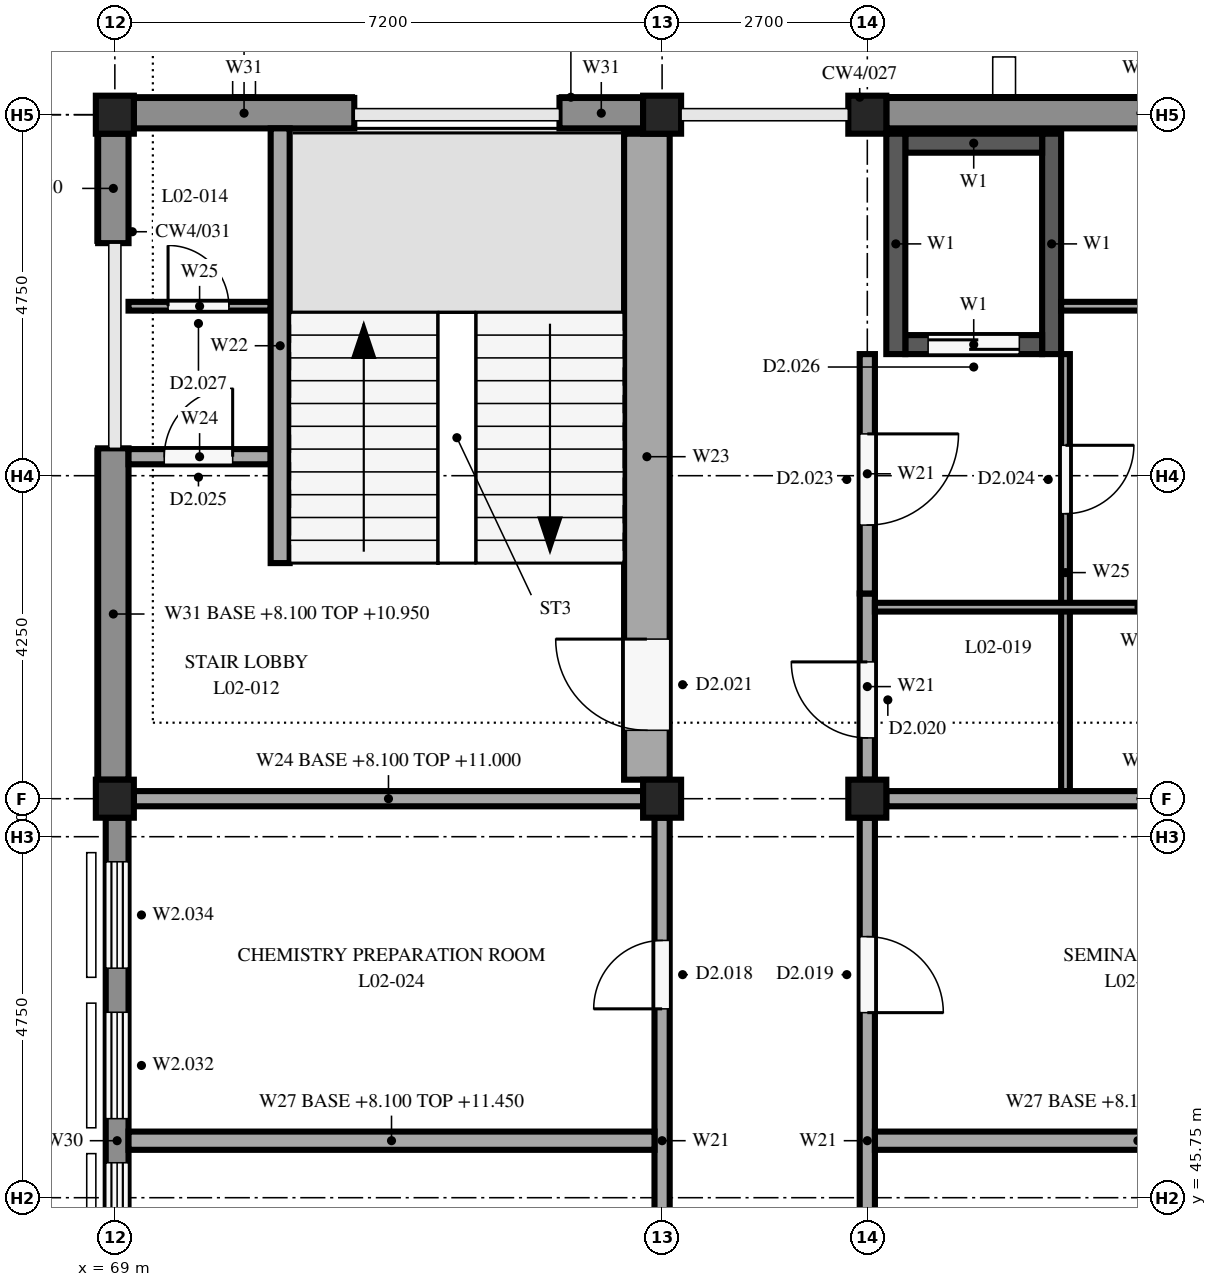
"""IFC4 building model, lengths in metres.
Left out: names, types, materials, properties, quantities, classifications, styles, units other than length and angle.
Written with IfcOpenShell. Run it as: python <this file> out.ifc"""

import sys

from ifc_helpers import new_model, si_unit, direction, frame, frame_2d, origin, origin_2d, place, context, subcontext, project, spatial, rectangle, extrude, element, fill, save


model = new_model("IFC4")
c1 = context("Model", 3, precision=1e-05, world=origin(), true_north=direction((0.0, 1.0)))
c2 = subcontext(c1, "Body", "Model", "MODEL_VIEW")
j1 = project(units=[si_unit("LENGTHUNIT", "METRE"), si_unit("PLANEANGLEUNIT", "RADIAN")], contexts=[c1])
p1 = place(None, origin())
s1 = spatial("IfcSite", under=j1, at=p1, CompositionType="ELEMENT")
p2 = place(p1, origin())
s2 = spatial("IfcBuilding", under=s1, at=p2, CompositionType="ELEMENT")
p3 = place(p2, frame((0.0, 0.0, 8.1)))
s3 = spatial("IfcBuildingStorey", under=s2, at=p3, CompositionType="ELEMENT", Elevation=8.1)
for number, where, z_axis, x_axis in (
    (1, (69.0, 51.0, 0.0), (0.0, 0.0, 1.0), (1.0, 0.0, 0.0)),
    (2, (69.0, 60.0, 0.0), (0.0, 0.0, 1.0), (1.0, 0.0, 0.0)),
    (3, (76.2, 51.0, 0.0), (0.0, 0.0, 1.0), (1.0, 0.0, 0.0)),
    (4, (76.2, 60.0, 0.0), (0.0, 0.0, 1.0), (1.0, 0.0, 0.0)),
    (5, (78.9, 51.0, 0.0), (0.0, 0.0, 1.0), (1.0, 0.0, 0.0)),
    (6, (78.9, 60.0, 0.0), (0.0, 0.0, 1.0), (1.0, 0.0, 0.0)),
):
    element("IfcColumn", number, at=place(p3, frame(where, z_axis=z_axis, x_axis=x_axis)), inside=s3, PredefinedType="COLUMN", context=c2, shape_type="SweptSolid", body=[
        extrude(rectangle(XDim=0.5, YDim=0.5, at=origin_2d()), origin(), (0.0, 0.0, 1.0), 3.35),
    ])
for number, where, z_axis, x_axis in (
    (7, (79.275, 56.85, 0.0), (0.0, 0.0, 1.0), (0.0, 1.0, 0.0)),
    (8, (81.325, 56.85, 0.0), (0.0, 0.0, 1.0), (0.0, 1.0, 0.0)),
):
    element("IfcWall", number, at=place(p3, frame(where, z_axis=z_axis, x_axis=x_axis)), inside=s3, PredefinedType="SHEAR", context=c2, shape_type="SweptSolid", body=[
        extrude(rectangle(XDim=2.9, YDim=0.25, at=frame_2d((1.45, 0.0))), origin(), (0.0, 0.0, 1.0), 3.35),
    ])
p4 = place(p3, frame((79.4, 56.975, 0.0), z_axis=(0.0, 0.0, 1.0), x_axis=(1.0, 0.0, 0.0)))
e9 = element("IfcWall", 9, at=p4, inside=s3, PredefinedType="SHEAR", context=c2, shape_type="SweptSolid", body=[
    extrude(rectangle(XDim=1.8, YDim=0.25, at=frame_2d((0.9, 0.0))), origin(), (0.0, 0.0, 1.0), 3.35),
])
p5 = place(p4, frame((0.3, 0.0, 0.0)))
e10 = element("IfcOpeningElement", 10, at=p5, cuts=e9, PredefinedType="OPENING", context=c2, shape_type="SweptSolid", body=[
    extrude(rectangle(XDim=1.2, YDim=2.1, at=frame_2d((0.6, 1.05))), frame((0.0, 0.135, 0.0), z_axis=(0.0, -1.0, 0.0), x_axis=(1.0, 0.0, 0.0)), (0.0, 0.0, 1.0), 0.27),
])
p6 = place(p3, frame((79.4, 59.625, 0.0), z_axis=(0.0, 0.0, 1.0), x_axis=(1.0, 0.0, 0.0)))
e11 = element("IfcWall", 11, at=p6, inside=s3, PredefinedType="SHEAR", context=c2, shape_type="SweptSolid", body=[
    extrude(rectangle(XDim=1.8, YDim=0.25, at=frame_2d((0.9, 0.0))), origin(), (0.0, 0.0, 1.0), 3.35),
])
p7 = place(p3, frame((69.03, 42.25, 0.0), z_axis=(0.0, 0.0, 1.0), x_axis=(0.0, 1.0, 0.0)))
e12 = element("IfcWall", 12, at=p7, inside=s3, PredefinedType="STANDARD", context=c2, shape_type="SweptSolid", body=[
    extrude(rectangle(XDim=8.5, YDim=0.3, at=frame_2d((4.25, 0.0))), origin(), (0.0, 0.0, 1.0), 2.85),
])
p8 = place(p7, frame((0.58, 0.0, 0.9)))
e13 = element("IfcOpeningElement", 13, at=p8, cuts=e12, PredefinedType="OPENING", context=c2, shape_type="SweptSolid", body=[
    extrude(rectangle(XDim=1.4, YDim=1.9, at=frame_2d((0.7, 0.95))), frame((0.0, 0.16, 0.0), z_axis=(0.0, -1.0, 0.0), x_axis=(1.0, 0.0, 0.0)), (0.0, 0.0, 1.0), 0.32),
])
p9 = place(p7, frame((2.56, 0.0, 0.9)))
e14 = element("IfcOpeningElement", 14, at=p9, cuts=e12, PredefinedType="OPENING", context=c2, shape_type="SweptSolid", body=[
    extrude(rectangle(XDim=1.4, YDim=1.9, at=frame_2d((0.7, 0.95))), frame((0.0, 0.16, 0.0), z_axis=(0.0, -1.0, 0.0), x_axis=(1.0, 0.0, 0.0)), (0.0, 0.0, 1.0), 0.32),
])
p10 = place(p7, frame((4.54, 0.0, 0.9)))
e15 = element("IfcOpeningElement", 15, at=p10, cuts=e12, PredefinedType="OPENING", context=c2, shape_type="SweptSolid", body=[
    extrude(rectangle(XDim=1.4, YDim=1.9, at=frame_2d((0.7, 0.95))), frame((0.0, 0.16, 0.0), z_axis=(0.0, -1.0, 0.0), x_axis=(1.0, 0.0, 0.0)), (0.0, 0.0, 1.0), 0.32),
])
p11 = place(p7, frame((6.52, 0.0, 0.9)))
e16 = element("IfcOpeningElement", 16, at=p11, cuts=e12, PredefinedType="OPENING", context=c2, shape_type="SweptSolid", body=[
    extrude(rectangle(XDim=1.4, YDim=1.9, at=frame_2d((0.7, 0.95))), frame((0.0, 0.16, 0.0), z_axis=(0.0, -1.0, 0.0), x_axis=(1.0, 0.0, 0.0)), (0.0, 0.0, 1.0), 0.32),
])
p12 = place(p3, frame((68.98, 51.25, 0.0), z_axis=(0.0, 0.0, 1.0), x_axis=(0.0, 1.0, 0.0)))
e17 = element("IfcWall", 17, at=p12, inside=s3, PredefinedType="STANDARD", context=c2, shape_type="SweptSolid", body=[
    extrude(rectangle(XDim=4.36, YDim=0.4, at=frame_2d((2.18, 0.0))), origin(), (0.0, 0.0, 1.0), 2.85),
])
p13 = place(p3, frame((68.98, 58.31, 0.0), z_axis=(0.0, 0.0, 1.0), x_axis=(0.0, 1.0, 0.0)))
e18 = element("IfcWall", 18, at=p13, inside=s3, PredefinedType="STANDARD", context=c2, shape_type="SweptSolid", body=[
    extrude(rectangle(XDim=1.44, YDim=0.4, at=frame_2d((0.72, 0.0))), origin(), (0.0, 0.0, 1.0), 2.85),
])
p14 = place(p3, frame((69.25, 60.02, 0.0), z_axis=(0.0, 0.0, 1.0), x_axis=(1.0, 0.0, 0.0)))
e19 = element("IfcWall", 19, at=p14, inside=s3, PredefinedType="STANDARD", context=c2, shape_type="SweptSolid", body=[
    extrude(rectangle(XDim=2.9, YDim=0.4, at=frame_2d((1.45, 0.0))), origin(), (0.0, 0.0, 1.0), 2.9),
])
p15 = place(p3, frame((74.85, 60.02, 0.0), z_axis=(0.0, 0.0, 1.0), x_axis=(1.0, 0.0, 0.0)))
e20 = element("IfcWall", 20, at=p15, inside=s3, PredefinedType="STANDARD", context=c2, shape_type="SweptSolid", body=[
    extrude(rectangle(XDim=1.1, YDim=0.4, at=frame_2d((0.55, 0.0))), origin(), (0.0, 0.0, 1.0), 2.9),
])
p16 = place(p3, frame((79.15, 60.02, 0.0), z_axis=(0.0, 0.0, 1.0), x_axis=(1.0, 0.0, 0.0)))
e21 = element("IfcWall", 21, at=p16, inside=s3, PredefinedType="STANDARD", context=c2, shape_type="SweptSolid", body=[
    extrude(rectangle(XDim=6.7, YDim=0.4, at=frame_2d((3.35, 0.0))), origin(), (0.0, 0.0, 1.0), 2.9),
])
p17 = place(p16, frame((3.4, 0.0, 1.6)))
e22 = element("IfcOpeningElement", 22, at=p17, cuts=e21, PredefinedType="OPENING", context=c2, shape_type="SweptSolid", body=[
    extrude(rectangle(XDim=0.9, YDim=1.0, at=frame_2d((0.45, 0.5))), frame((0.0, 0.21, 0.0), z_axis=(0.0, -1.0, 0.0), x_axis=(1.0, 0.0, 0.0)), (0.0, 0.0, 1.0), 0.42),
])
p18 = place(p3, frame((71.175, 54.1, 0.0), z_axis=(0.0, 0.0, 1.0), x_axis=(0.0, 1.0, 0.0)))
e23 = element("IfcWall", 23, at=p18, inside=s3, PredefinedType="SOLIDWALL", context=c2, shape_type="SweptSolid", body=[
    extrude(rectangle(XDim=5.72, YDim=0.25, at=frame_2d((2.86, 0.0))), origin(), (0.0, 0.0, 1.0), 3.35),
])
p19 = place(p3, frame((76.0, 51.25, 0.0), z_axis=(0.0, 0.0, 1.0), x_axis=(0.0, 1.0, 0.0)))
e24 = element("IfcWall", 24, at=p19, inside=s3, PredefinedType="SOLIDWALL", context=c2, shape_type="SweptSolid", body=[
    extrude(rectangle(XDim=8.5, YDim=0.6, at=frame_2d((4.25, 0.0))), origin(), (0.0, 0.0, 1.0), 3.35),
])
p20 = place(p19, frame((0.65, 0.0, 0.0)))
e25 = element("IfcOpeningElement", 25, at=p20, cuts=e24, PredefinedType="OPENING", context=c2, shape_type="SweptSolid", body=[
    extrude(rectangle(XDim=1.2, YDim=2.1, at=frame_2d((0.6, 1.05))), frame((0.0, 0.31, 0.0), z_axis=(0.0, -1.0, 0.0), x_axis=(1.0, 0.0, 0.0)), (0.0, 0.0, 1.0), 0.62),
])
p21 = place(p3, frame((69.18, 55.5, 0.0), z_axis=(0.0, 0.0, 1.0), x_axis=(1.0, 0.0, 0.0)))
e26 = element("IfcWall", 26, at=p21, inside=s3, PredefinedType="SOLIDWALL", context=c2, shape_type="SweptSolid", body=[
    extrude(rectangle(XDim=1.87, YDim=0.2, at=frame_2d((0.935, 0.0))), origin(), (0.0, 0.0, 1.0), 3.35),
])
p22 = place(p21, frame((0.47, 0.0, 0.0)))
e27 = element("IfcOpeningElement", 27, at=p22, cuts=e26, PredefinedType="OPENING", context=c2, shape_type="SweptSolid", body=[
    extrude(rectangle(XDim=0.9, YDim=2.1, at=frame_2d((0.45, 1.05))), frame((0.0, 0.11, 0.0), z_axis=(0.0, -1.0, 0.0), x_axis=(1.0, 0.0, 0.0)), (0.0, 0.0, 1.0), 0.22),
])
p23 = place(p3, frame((69.18, 57.48, 0.0), z_axis=(0.0, 0.0, 1.0), x_axis=(1.0, 0.0, 0.0)))
e28 = element("IfcWall", 28, at=p23, inside=s3, PredefinedType="PARTITIONING", context=c2, shape_type="SweptSolid", body=[
    extrude(rectangle(XDim=1.87, YDim=0.115, at=frame_2d((0.935, 0.0))), origin(), (0.0, 0.0, 1.0), 3.35),
])
p24 = place(p23, frame((0.52, 0.0, 0.0)))
e29 = element("IfcOpeningElement", 29, at=p24, cuts=e28, PredefinedType="OPENING", context=c2, shape_type="SweptSolid", body=[
    extrude(rectangle(XDim=0.8, YDim=2.1, at=frame_2d((0.4, 1.05))), frame((0.0, 0.067, 0.0), z_axis=(0.0, -1.0, 0.0), x_axis=(1.0, 0.0, 0.0)), (0.0, 0.0, 1.0), 0.135),
])
p25 = place(p3, frame((69.25, 51.0, 0.0), z_axis=(0.0, 0.0, 1.0), x_axis=(1.0, 0.0, 0.0)))
e30 = element("IfcWall", 30, at=p25, inside=s3, PredefinedType="SOLIDWALL", context=c2, shape_type="SweptSolid", body=[
    extrude(rectangle(XDim=6.7, YDim=0.2, at=frame_2d((3.35, 0.0))), origin(), (0.0, 0.0, 1.0), 2.9),
])
p26 = place(p3, frame((78.9, 51.25, 0.0), z_axis=(0.0, 0.0, 1.0), x_axis=(0.0, 1.0, 0.0)))
e31 = element("IfcWall", 31, at=p26, inside=s3, PredefinedType="PARTITIONING", context=c2, shape_type="SweptSolid", body=[
    extrude(rectangle(XDim=2.45, YDim=0.2, at=frame_2d((1.225, 0.0))), origin(), (0.0, 0.0, 1.0), 2.9),
])
p27 = place(p26, frame((0.55, 0.0, 0.0)))
e32 = element("IfcOpeningElement", 32, at=p27, cuts=e31, PredefinedType="OPENING", context=c2, shape_type="SweptSolid", body=[
    extrude(rectangle(XDim=1.0, YDim=2.1, at=frame_2d((0.5, 1.05))), frame((0.0, 0.11, 0.0), z_axis=(0.0, -1.0, 0.0), x_axis=(1.0, 0.0, 0.0)), (0.0, 0.0, 1.0), 0.22),
])
p28 = place(p3, frame((78.9, 56.85, 0.0), z_axis=(0.0, 0.0, 1.0), x_axis=(0.0, -1.0, 0.0)))
e33 = element("IfcWall", 33, at=p28, inside=s3, PredefinedType="PARTITIONING", context=c2, shape_type="SweptSolid", body=[
    extrude(rectangle(XDim=3.15, YDim=0.2, at=frame_2d((1.575, 0.0))), origin(), (0.0, 0.0, 1.0), 2.9),
])
p29 = place(p28, frame((1.05, 0.0, 0.0)))
e34 = element("IfcOpeningElement", 34, at=p29, cuts=e33, PredefinedType="OPENING", context=c2, shape_type="SweptSolid", body=[
    extrude(rectangle(XDim=1.2, YDim=2.1, at=frame_2d((0.6, 1.05))), frame((0.0, 0.11, 0.0), z_axis=(0.0, -1.0, 0.0), x_axis=(1.0, 0.0, 0.0)), (0.0, 0.0, 1.0), 0.22),
])
p30 = place(p3, frame((79.15, 51.0, 0.0), z_axis=(0.0, 0.0, 1.0), x_axis=(1.0, 0.0, 0.0)))
e35 = element("IfcWall", 35, at=p30, inside=s3, PredefinedType="PARTITIONING", context=c2, shape_type="SweptSolid", body=[
    extrude(rectangle(XDim=6.7, YDim=0.2, at=frame_2d((3.35, 0.0))), origin(), (0.0, 0.0, 1.0), 2.9),
])
p31 = place(p3, frame((81.508, 56.85, 0.0), z_axis=(0.0, 0.0, 1.0), x_axis=(0.0, -1.0, 0.0)))
e36 = element("IfcWall", 36, at=p31, inside=s3, PredefinedType="PARTITIONING", context=c2, shape_type="SweptSolid", body=[
    extrude(rectangle(XDim=5.75, YDim=0.115, at=frame_2d((2.875, 0.0))), origin(), (0.0, 0.0, 1.0), 3.35),
])
p32 = place(p31, frame((1.2, 0.0, 0.0)))
e37 = element("IfcOpeningElement", 37, at=p32, cuts=e36, PredefinedType="OPENING", context=c2, shape_type="SweptSolid", body=[
    extrude(rectangle(XDim=0.9, YDim=2.1, at=frame_2d((0.45, 1.05))), frame((0.0, 0.067, 0.0), z_axis=(0.0, -1.0, 0.0), x_axis=(1.0, 0.0, 0.0)), (0.0, 0.0, 1.0), 0.135),
])
p33 = place(p3, frame((81.45, 57.48, 0.0), z_axis=(0.0, 0.0, 1.0), x_axis=(1.0, 0.0, 0.0)))
e38 = element("IfcWall", 38, at=p33, inside=s3, PredefinedType="PARTITIONING", context=c2, shape_type="SweptSolid", body=[
    extrude(rectangle(XDim=4.5, YDim=0.115, at=frame_2d((2.25, 0.0))), origin(), (0.0, 0.0, 1.0), 3.35),
])
p34 = place(p33, frame((1.8, 0.0, 0.0)))
e39 = element("IfcOpeningElement", 39, at=p34, cuts=e38, PredefinedType="OPENING", context=c2, shape_type="SweptSolid", body=[
    extrude(rectangle(XDim=0.9, YDim=2.1, at=frame_2d((0.45, 1.05))), frame((0.0, 0.067, 0.0), z_axis=(0.0, -1.0, 0.0), x_axis=(1.0, 0.0, 0.0)), (0.0, 0.0, 1.0), 0.135),
])
p35 = place(p3, frame((85.95, 53.52, 0.0), z_axis=(0.0, 0.0, 1.0), x_axis=(-1.0, 0.0, 0.0)))
e40 = element("IfcWall", 40, at=p35, inside=s3, PredefinedType="PARTITIONING", context=c2, shape_type="SweptSolid", body=[
    extrude(rectangle(XDim=6.95, YDim=0.115, at=frame_2d((3.475, 0.0))), origin(), (0.0, 0.0, 1.0), 3.35),
])
p36 = place(p35, frame((1.7, 0.0, 0.0)))
e41 = element("IfcOpeningElement", 41, at=p36, cuts=e40, PredefinedType="OPENING", context=c2, shape_type="SweptSolid", body=[
    extrude(rectangle(XDim=0.9, YDim=2.1, at=frame_2d((0.45, 1.05))), frame((0.0, 0.067, 0.0), z_axis=(0.0, -1.0, 0.0), x_axis=(1.0, 0.0, 0.0)), (0.0, 0.0, 1.0), 0.135),
])
p37 = place(p3, frame((76.2, 42.25, 0.0), z_axis=(0.0, 0.0, 1.0), x_axis=(0.0, 1.0, 0.0)))
e42 = element("IfcWall", 42, at=p37, inside=s3, PredefinedType="PARTITIONING", context=c2, shape_type="SweptSolid", body=[
    extrude(rectangle(XDim=8.5, YDim=0.2, at=frame_2d((4.25, 0.0))), origin(), (0.0, 0.0, 1.0), 2.9),
])
p38 = place(p37, frame((5.985, 0.0, 0.0)))
e43 = element("IfcOpeningElement", 43, at=p38, cuts=e42, PredefinedType="OPENING", context=c2, shape_type="SweptSolid", body=[
    extrude(rectangle(XDim=0.9, YDim=2.1, at=frame_2d((0.45, 1.05))), frame((0.0, 0.11, 0.0), z_axis=(0.0, -1.0, 0.0), x_axis=(1.0, 0.0, 0.0)), (0.0, 0.0, 1.0), 0.22),
])
p39 = place(p3, frame((69.18, 46.5, 0.0), z_axis=(0.0, 0.0, 1.0), x_axis=(1.0, 0.0, 0.0)))
e44 = element("IfcWall", 44, at=p39, inside=s3, PredefinedType="PARTITIONING", context=c2, shape_type="SweptSolid", body=[
    extrude(rectangle(XDim=6.92, YDim=0.24, at=frame_2d((3.46, 0.0))), origin(), (0.0, 0.0, 1.0), 3.35),
])
p40 = place(p3, frame((78.9, 50.75, 0.0), z_axis=(0.0, 0.0, 1.0), x_axis=(0.0, -1.0, 0.0)))
e45 = element("IfcWall", 45, at=p40, inside=s3, PredefinedType="PARTITIONING", context=c2, shape_type="SweptSolid", body=[
    extrude(rectangle(XDim=8.5, YDim=0.2, at=frame_2d((4.25, 0.0))), origin(), (0.0, 0.0, 1.0), 2.9),
])
p41 = place(p40, frame((1.565, 0.0, 0.0)))
e46 = element("IfcOpeningElement", 46, at=p41, cuts=e45, PredefinedType="OPENING", context=c2, shape_type="SweptSolid", body=[
    extrude(rectangle(XDim=1.0, YDim=2.1, at=frame_2d((0.5, 1.05))), frame((0.0, 0.11, 0.0), z_axis=(0.0, -1.0, 0.0), x_axis=(1.0, 0.0, 0.0)), (0.0, 0.0, 1.0), 0.22),
])
p42 = place(p3, frame((79.0, 46.5, 0.0), z_axis=(0.0, 0.0, 1.0), x_axis=(1.0, 0.0, 0.0)))
e47 = element("IfcWall", 47, at=p42, inside=s3, PredefinedType="PARTITIONING", context=c2, shape_type="SweptSolid", body=[
    extrude(rectangle(XDim=6.92, YDim=0.24, at=frame_2d((3.46, 0.0))), origin(), (0.0, 0.0, 1.0), 3.35),
])
p43 = place(p9, origin())
e48 = element("IfcWindow", 48, at=p43, inside=s3, PartitioningType="DOUBLE_PANEL_VERTICAL", PredefinedType="WINDOW", context=c2, shape_type="SweptSolid", body=[
    extrude(rectangle(XDim=1.4, YDim=1.9, at=frame_2d((0.7, 0.95))), frame((0.0, 0.03, 0.0), z_axis=(0.0, -1.0, 0.0), x_axis=(1.0, 0.0, 0.0)), (0.0, 0.0, 1.0), 0.06),
])
fill(e14, e48)
p44 = place(p10, origin())
e49 = element("IfcWindow", 49, at=p44, inside=s3, PartitioningType="DOUBLE_PANEL_VERTICAL", PredefinedType="WINDOW", context=c2, shape_type="SweptSolid", body=[
    extrude(rectangle(XDim=1.4, YDim=1.9, at=frame_2d((0.7, 0.95))), frame((0.0, 0.03, 0.0), z_axis=(0.0, -1.0, 0.0), x_axis=(1.0, 0.0, 0.0)), (0.0, 0.0, 1.0), 0.06),
])
fill(e15, e49)
p45 = place(p11, origin())
e50 = element("IfcWindow", 50, at=p45, inside=s3, PartitioningType="DOUBLE_PANEL_VERTICAL", PredefinedType="WINDOW", context=c2, shape_type="SweptSolid", body=[
    extrude(rectangle(XDim=1.4, YDim=1.9, at=frame_2d((0.7, 0.95))), frame((0.0, 0.03, 0.0), z_axis=(0.0, -1.0, 0.0), x_axis=(1.0, 0.0, 0.0)), (0.0, 0.0, 1.0), 0.06),
])
fill(e16, e50)
p46 = place(p20, origin())
e51 = element("IfcDoor", 51, at=p46, inside=s3, OperationType="SINGLE_SWING_RIGHT", PredefinedType="DOOR", context=c2, shape_type="SweptSolid", body=[
    extrude(rectangle(XDim=1.2, YDim=2.1, at=frame_2d((0.6, 1.05))), frame((0.0, 0.025, 0.0), z_axis=(0.0, -1.0, 0.0), x_axis=(1.0, 0.0, 0.0)), (0.0, 0.0, 1.0), 0.05),
])
fill(e25, e51)
p47 = place(p22, origin())
e52 = element("IfcDoor", 52, at=p47, inside=s3, OperationType="SINGLE_SWING_RIGHT", PredefinedType="DOOR", context=c2, shape_type="SweptSolid", body=[
    extrude(rectangle(XDim=0.9, YDim=2.1, at=frame_2d((0.45, 1.05))), frame((0.0, 0.025, 0.0), z_axis=(0.0, -1.0, 0.0), x_axis=(1.0, 0.0, 0.0)), (0.0, 0.0, 1.0), 0.05),
])
fill(e27, e52)
p48 = place(p24, origin())
e53 = element("IfcDoor", 53, at=p48, inside=s3, OperationType="SINGLE_SWING_LEFT", PredefinedType="DOOR", context=c2, shape_type="SweptSolid", body=[
    extrude(rectangle(XDim=0.8, YDim=2.1, at=frame_2d((0.4, 1.05))), frame((0.0, 0.025, 0.0), z_axis=(0.0, -1.0, 0.0), x_axis=(1.0, 0.0, 0.0)), (0.0, 0.0, 1.0), 0.05),
])
fill(e29, e53)
p49 = place(p27, origin())
e54 = element("IfcDoor", 54, at=p49, inside=s3, OperationType="SINGLE_SWING_RIGHT", PredefinedType="DOOR", context=c2, shape_type="SweptSolid", body=[
    extrude(rectangle(XDim=1.0, YDim=2.1, at=frame_2d((0.5, 1.05))), frame((0.0, 0.025, 0.0), z_axis=(0.0, -1.0, 0.0), x_axis=(1.0, 0.0, 0.0)), (0.0, 0.0, 1.0), 0.05),
])
fill(e32, e54)
p50 = place(p29, origin())
e55 = element("IfcDoor", 55, at=p50, inside=s3, OperationType="SINGLE_SWING_LEFT", PredefinedType="DOOR", context=c2, shape_type="SweptSolid", body=[
    extrude(rectangle(XDim=1.2, YDim=2.1, at=frame_2d((0.6, 1.05))), frame((0.0, 0.025, 0.0), z_axis=(0.0, -1.0, 0.0), x_axis=(1.0, 0.0, 0.0)), (0.0, 0.0, 1.0), 0.05),
])
fill(e34, e55)
p51 = place(p32, origin())
e56 = element("IfcDoor", 56, at=p51, inside=s3, OperationType="SINGLE_SWING_LEFT", PredefinedType="DOOR", context=c2, shape_type="SweptSolid", body=[
    extrude(rectangle(XDim=0.9, YDim=2.1, at=frame_2d((0.45, 1.05))), frame((0.0, 0.025, 0.0), z_axis=(0.0, -1.0, 0.0), x_axis=(1.0, 0.0, 0.0)), (0.0, 0.0, 1.0), 0.05),
])
fill(e37, e56)
p52 = place(p38, origin())
e57 = element("IfcDoor", 57, at=p52, inside=s3, OperationType="SINGLE_SWING_LEFT", PredefinedType="DOOR", context=c2, shape_type="SweptSolid", body=[
    extrude(rectangle(XDim=0.9, YDim=2.1, at=frame_2d((0.45, 1.05))), frame((0.0, 0.025, 0.0), z_axis=(0.0, -1.0, 0.0), x_axis=(1.0, 0.0, 0.0)), (0.0, 0.0, 1.0), 0.05),
])
fill(e43, e57)
p53 = place(p41, origin())
e58 = element("IfcDoor", 58, at=p53, inside=s3, OperationType="SINGLE_SWING_RIGHT", PredefinedType="DOOR", context=c2, shape_type="SweptSolid", body=[
    extrude(rectangle(XDim=1.0, YDim=2.1, at=frame_2d((0.5, 1.05))), frame((0.0, 0.025, 0.0), z_axis=(0.0, -1.0, 0.0), x_axis=(1.0, 0.0, 0.0)), (0.0, 0.0, 1.0), 0.05),
])
fill(e46, e58)
p54 = place(p5, origin())
e59 = element("IfcDoor", 59, at=p54, inside=s3, OperationType="SLIDING_TO_LEFT", PredefinedType="DOOR", context=c2, shape_type="SweptSolid", body=[
    extrude(rectangle(XDim=1.2, YDim=2.1, at=frame_2d((0.6, 1.05))), frame((0.0, 0.025, 0.0), z_axis=(0.0, -1.0, 0.0), x_axis=(1.0, 0.0, 0.0)), (0.0, 0.0, 1.0), 0.05),
])
fill(e10, e59)
save(model, sys.argv[1])
